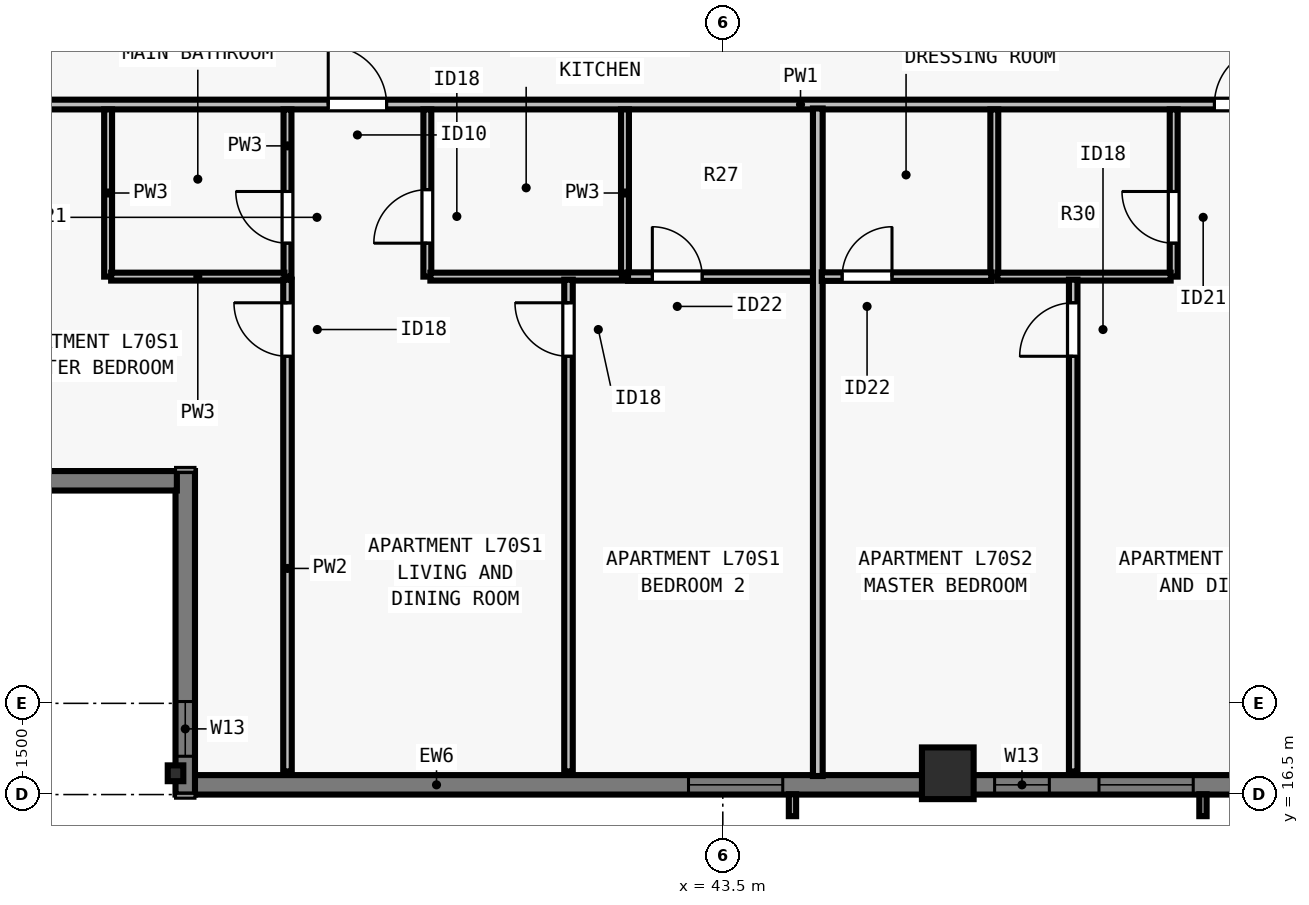
"""IFC4 building model, lengths in metres.
Left out: names, types, materials, properties, quantities, classifications, styles, units other than length and angle.
Written with IfcOpenShell. Run it as: python <this file> out.ifc"""

import sys

from ifc_helpers import new_model, si_unit, direction, frame, frame_2d, origin, origin_2d, place, context, subcontext, project, spatial, rectangle, i_section, extrude, element, fill, save


model = new_model("IFC4")
c1 = context("Model", 3, precision=1e-05, world=origin(), true_north=direction((0.0, 1.0)))
c2 = subcontext(c1, "Body", "Model", "MODEL_VIEW")
j1 = project(units=[si_unit("LENGTHUNIT", "METRE"), si_unit("PLANEANGLEUNIT", "RADIAN")], contexts=[c1])
p1 = place(None, origin())
s1 = spatial("IfcSite", under=j1, at=p1, CompositionType="ELEMENT")
p2 = place(p1, origin())
s2 = spatial("IfcBuilding", under=s1, at=p2, CompositionType="ELEMENT")
p3 = place(p2, frame((0.0, 0.0, 255.0)))
s3 = spatial("IfcBuildingStorey", under=s2, at=p3, CompositionType="ELEMENT", Elevation=255.0)
p4 = place(p3, frame((34.5, 16.85, 0.0), z_axis=(0.0, 0.0, 1.0), x_axis=(1.0, 0.0, 0.0)))
e1 = element("IfcColumn", 1, at=p4, inside=s3, PredefinedType="COLUMN", context=c2, shape_type="SweptSolid", body=[
    extrude(i_section(OverallWidth=0.256, OverallDepth=0.26, WebThickness=0.01, FlangeThickness=0.017, FilletRadius=0.013, at=origin_2d()), origin(), (0.0, 0.0, 1.0), 3.5),
])
p5 = place(p3, frame((47.2, 16.85, 0.0), z_axis=(0.0, 0.0, 1.0), x_axis=(1.0, 0.0, 0.0)))
e2 = element("IfcColumn", 2, at=p5, inside=s3, PredefinedType="COLUMN", context=c2, shape_type="SweptSolid", body=[
    extrude(rectangle(XDim=0.85, YDim=0.85, at=origin_2d()), origin(), (0.0, 0.0, 1.0), 3.5),
])
p6 = place(p3, frame((69.5, 16.66, 0.0), z_axis=(0.0, 0.0, 1.0), x_axis=(-1.0, 0.0, 0.0)))
e3 = element("IfcWall", 3, at=p6, inside=s3, PredefinedType="SOLIDWALL", context=c2, shape_type="SweptSolid", body=[
    extrude(rectangle(XDim=34.702, YDim=0.32, at=frame_2d((17.351, 0.0))), origin(), (0.0, 0.0, 1.0), 3.29),
])
p7 = place(p6, frame((4.312, 0.0, 0.8)))
e4 = element("IfcOpeningElement", 4, at=p7, cuts=e3, PredefinedType="OPENING", context=c2, shape_type="SweptSolid", body=[
    extrude(rectangle(XDim=1.55, YDim=1.678, at=frame_2d((0.775, 0.839))), frame((0.0, 0.17, 0.0), z_axis=(0.0, -1.0, 0.0), x_axis=(1.0, 0.0, 0.0)), (0.0, 0.0, 1.0), 0.34),
])
p8 = place(p6, frame((7.988, 0.0, 0.8)))
e5 = element("IfcOpeningElement", 5, at=p8, cuts=e3, PredefinedType="OPENING", context=c2, shape_type="SweptSolid", body=[
    extrude(rectangle(XDim=1.85, YDim=1.678, at=frame_2d((0.925, 0.839))), frame((0.0, 0.17, 0.0), z_axis=(0.0, -1.0, 0.0), x_axis=(1.0, 0.0, 0.0)), (0.0, 0.0, 1.0), 0.34),
])
p9 = place(p6, frame((15.188, 0.0, 0.8)))
e6 = element("IfcOpeningElement", 6, at=p9, cuts=e3, PredefinedType="OPENING", context=c2, shape_type="SweptSolid", body=[
    extrude(rectangle(XDim=1.85, YDim=1.678, at=frame_2d((0.925, 0.839))), frame((0.0, 0.17, 0.0), z_axis=(0.0, -1.0, 0.0), x_axis=(1.0, 0.0, 0.0)), (0.0, 0.0, 1.0), 0.34),
])
p10 = place(p6, frame((18.264, 0.0, 0.8)))
e7 = element("IfcOpeningElement", 7, at=p10, cuts=e3, PredefinedType="OPENING", context=c2, shape_type="SweptSolid", body=[
    extrude(rectangle(XDim=1.55, YDim=1.678, at=frame_2d((0.775, 0.839))), frame((0.0, 0.17, 0.0), z_axis=(0.0, -1.0, 0.0), x_axis=(1.0, 0.0, 0.0)), (0.0, 0.0, 1.0), 0.34),
])
p11 = place(p6, frame((25.014, 0.0, 0.8)))
e8 = element("IfcOpeningElement", 8, at=p11, cuts=e3, PredefinedType="OPENING", context=c2, shape_type="SweptSolid", body=[
    extrude(rectangle(XDim=1.55, YDim=1.678, at=frame_2d((0.775, 0.839))), frame((0.0, 0.17, 0.0), z_axis=(0.0, -1.0, 0.0), x_axis=(1.0, 0.0, 0.0)), (0.0, 0.0, 1.0), 0.34),
])
p12 = place(p6, frame((20.63, 0.0, 0.8)))
e9 = element("IfcOpeningElement", 9, at=p12, cuts=e3, PredefinedType="OPENING", context=c2, shape_type="SweptSolid", body=[
    extrude(rectangle(XDim=0.9, YDim=1.678, at=frame_2d((0.45, 0.839))), frame((0.0, 0.17, 0.0), z_axis=(0.0, -1.0, 0.0), x_axis=(1.0, 0.0, 0.0)), (0.0, 0.0, 1.0), 0.34),
])
p13 = place(p6, frame((10.87, 0.0, 0.8)))
e10 = element("IfcOpeningElement", 10, at=p13, cuts=e3, PredefinedType="OPENING", context=c2, shape_type="SweptSolid", body=[
    extrude(rectangle(XDim=0.9, YDim=1.678, at=frame_2d((0.45, 0.839))), frame((0.0, 0.17, 0.0), z_axis=(0.0, -1.0, 0.0), x_axis=(1.0, 0.0, 0.0)), (0.0, 0.0, 1.0), 0.34),
])
p14 = place(p3, frame((34.66, 16.5, 0.0), z_axis=(0.0, 0.0, 1.0), x_axis=(0.0, 1.0, 0.0)))
e11 = element("IfcWall", 11, at=p14, inside=s3, PredefinedType="SOLIDWALL", context=c2, shape_type="SweptSolid", body=[
    extrude(rectangle(XDim=5.32, YDim=0.32, at=frame_2d((2.66, 0.0))), origin(), (0.0, 0.0, 1.0), 3.29),
])
p15 = place(p14, frame((0.63, 0.0, 0.8)))
e12 = element("IfcOpeningElement", 12, at=p15, cuts=e11, PredefinedType="OPENING", context=c2, shape_type="SweptSolid", body=[
    extrude(rectangle(XDim=0.9, YDim=1.678, at=frame_2d((0.45, 0.839))), frame((0.0, 0.17, 0.0), z_axis=(0.0, -1.0, 0.0), x_axis=(1.0, 0.0, 0.0)), (0.0, 0.0, 1.0), 0.34),
])
p16 = place(p3, frame((34.522, 21.66, 0.0), z_axis=(0.0, 0.0, 1.0), x_axis=(-1.0, 0.0, 0.0)))
e13 = element("IfcWall", 13, at=p16, inside=s3, PredefinedType="SOLIDWALL", context=c2, shape_type="SweptSolid", body=[
    extrude(rectangle(XDim=4.724, YDim=0.32, at=frame_2d((2.362, 0.0))), origin(), (0.0, 0.0, 1.0), 3.29),
])
p17 = place(p3, frame((32.06, 27.847, 0.0), z_axis=(0.0, 0.0, 1.0), x_axis=(1.0, 0.0, 0.0)))
e14 = element("IfcWall", 14, at=p17, inside=s3, PredefinedType="PARTITIONING", context=c2, shape_type="SweptSolid", body=[
    extrude(rectangle(XDim=42.135, YDim=0.16, at=frame_2d((21.067, 0.0))), origin(), (0.0, 0.0, 1.0), 2.958),
])
p18 = place(p17, frame((4.951, 0.0, 0.0)))
e15 = element("IfcOpeningElement", 15, at=p18, cuts=e14, PredefinedType="OPENING", context=c2, shape_type="SweptSolid", body=[
    extrude(rectangle(XDim=0.96, YDim=2.18, at=frame_2d((0.48, 1.09))), frame((0.0, 0.09, 0.0), z_axis=(0.0, -1.0, 0.0), x_axis=(1.0, 0.0, 0.0)), (0.0, 0.0, 1.0), 0.18),
])
p19 = place(p17, frame((19.525, 0.0, 0.0)))
e16 = element("IfcOpeningElement", 16, at=p19, cuts=e14, PredefinedType="OPENING", context=c2, shape_type="SweptSolid", body=[
    extrude(rectangle(XDim=0.96, YDim=2.18, at=frame_2d((0.48, 1.09))), frame((0.0, 0.09, 0.0), z_axis=(0.0, -1.0, 0.0), x_axis=(1.0, 0.0, 0.0)), (0.0, 0.0, 1.0), 0.18),
])
p20 = place(p17, frame((34.034, 0.0, 0.0)))
e17 = element("IfcOpeningElement", 17, at=p20, cuts=e14, PredefinedType="OPENING", context=c2, shape_type="SweptSolid", body=[
    extrude(rectangle(XDim=0.96, YDim=2.18, at=frame_2d((0.48, 1.09))), frame((0.0, 0.09, 0.0), z_axis=(0.0, -1.0, 0.0), x_axis=(1.0, 0.0, 0.0)), (0.0, 0.0, 1.0), 0.18),
])
p21 = place(p3, frame((33.391, 25.018, 0.0), z_axis=(0.0, 0.0, 1.0), x_axis=(0.0, 1.0, 0.0)))
e18 = element("IfcWall", 18, at=p21, inside=s3, PredefinedType="PLUMBINGWALL", context=c2, shape_type="SweptSolid", body=[
    extrude(rectangle(XDim=2.75, YDim=0.13, at=frame_2d((1.375, 0.0))), origin(), (0.0, 0.0, 1.0), 3.29),
])
p22 = place(p3, frame((36.341, 25.018, 0.0), z_axis=(0.0, 0.0, 1.0), x_axis=(0.0, 1.0, 0.0)))
e19 = element("IfcWall", 19, at=p22, inside=s3, PredefinedType="PLUMBINGWALL", context=c2, shape_type="SweptSolid", body=[
    extrude(rectangle(XDim=2.75, YDim=0.13, at=frame_2d((1.375, 0.0))), origin(), (0.0, 0.0, 1.0), 3.29),
])
p23 = place(p22, frame((0.55, 0.0, 0.0)))
e20 = element("IfcOpeningElement", 20, at=p23, cuts=e19, PredefinedType="OPENING", context=c2, shape_type="SweptSolid", body=[
    extrude(rectangle(XDim=0.85, YDim=2.08, at=frame_2d((0.425, 1.04))), frame((0.0, 0.075, 0.0), z_axis=(0.0, -1.0, 0.0), x_axis=(1.0, 0.0, 0.0)), (0.0, 0.0, 1.0), 0.15),
])
p24 = place(p3, frame((33.441, 25.018, 0.0), z_axis=(0.0, 0.0, 1.0), x_axis=(1.0, 0.0, 0.0)))
e21 = element("IfcWall", 21, at=p24, inside=s3, PredefinedType="PLUMBINGWALL", context=c2, shape_type="SweptSolid", body=[
    extrude(rectangle(XDim=2.85, YDim=0.13, at=frame_2d((1.425, 0.0))), origin(), (0.0, 0.0, 1.0), 2.958),
])
p25 = place(p3, frame((41.891, 25.018, 0.0), z_axis=(0.0, 0.0, 1.0), x_axis=(0.0, 1.0, 0.0)))
e22 = element("IfcWall", 22, at=p25, inside=s3, PredefinedType="PLUMBINGWALL", context=c2, shape_type="SweptSolid", body=[
    extrude(rectangle(XDim=2.75, YDim=0.13, at=frame_2d((1.375, 0.0))), origin(), (0.0, 0.0, 1.0), 3.29),
])
p26 = place(p3, frame((38.641, 25.018, 0.0), z_axis=(0.0, 0.0, 1.0), x_axis=(0.0, 1.0, 0.0)))
e23 = element("IfcWall", 23, at=p26, inside=s3, PredefinedType="PLUMBINGWALL", context=c2, shape_type="SweptSolid", body=[
    extrude(rectangle(XDim=2.75, YDim=0.13, at=frame_2d((1.375, 0.0))), origin(), (0.0, 0.0, 1.0), 3.29),
])
p27 = place(p26, frame((0.55, 0.0, 0.0)))
e24 = element("IfcOpeningElement", 24, at=p27, cuts=e23, PredefinedType="OPENING", context=c2, shape_type="SweptSolid", body=[
    extrude(rectangle(XDim=0.88, YDim=2.1, at=frame_2d((0.44, 1.05))), frame((0.0, 0.075, 0.0), z_axis=(0.0, -1.0, 0.0), x_axis=(1.0, 0.0, 0.0)), (0.0, 0.0, 1.0), 0.15),
])
p28 = place(p3, frame((38.691, 25.018, 0.0), z_axis=(0.0, 0.0, 1.0), x_axis=(1.0, 0.0, 0.0)))
e25 = element("IfcWall", 25, at=p28, inside=s3, PredefinedType="PLUMBINGWALL", context=c2, shape_type="SweptSolid", body=[
    extrude(rectangle(XDim=3.15, YDim=0.13, at=frame_2d((1.575, 0.0))), origin(), (0.0, 0.0, 1.0), 3.29),
])
p29 = place(p3, frame((36.341, 16.88, 0.0), z_axis=(0.0, 0.0, 1.0), x_axis=(0.0, 1.0, 0.0)))
e26 = element("IfcWall", 26, at=p29, inside=s3, PredefinedType="PARTITIONING", context=c2, shape_type="SweptSolid", body=[
    extrude(rectangle(XDim=8.088, YDim=0.14, at=frame_2d((4.044, 0.0))), origin(), (0.0, 0.0, 1.0), 2.573),
])
p30 = place(p29, frame((6.827, 0.0, 0.0)))
e27 = element("IfcOpeningElement", 27, at=p30, cuts=e26, PredefinedType="OPENING", context=c2, shape_type="SweptSolid", body=[
    extrude(rectangle(XDim=0.88, YDim=2.1, at=frame_2d((0.44, 1.05))), frame((0.0, 0.08, 0.0), z_axis=(0.0, -1.0, 0.0), x_axis=(1.0, 0.0, 0.0)), (0.0, 0.0, 1.0), 0.16),
])
p31 = place(p3, frame((40.962, 16.88, 0.0), z_axis=(0.0, 0.0, 1.0), x_axis=(0.0, 1.0, 0.0)))
e28 = element("IfcWall", 28, at=p31, inside=s3, PredefinedType="PARTITIONING", context=c2, shape_type="SweptSolid", body=[
    extrude(rectangle(XDim=8.088, YDim=0.14, at=frame_2d((4.044, 0.0))), origin(), (0.0, 0.0, 1.0), 3.29),
])
p32 = place(p31, frame((6.827, 0.0, 0.0)))
e29 = element("IfcOpeningElement", 29, at=p32, cuts=e28, PredefinedType="OPENING", context=c2, shape_type="SweptSolid", body=[
    extrude(rectangle(XDim=0.88, YDim=2.1, at=frame_2d((0.44, 1.05))), frame((0.0, 0.08, 0.0), z_axis=(0.0, -1.0, 0.0), x_axis=(1.0, 0.0, 0.0)), (0.0, 0.0, 1.0), 0.16),
])
p33 = place(p3, frame((41.941, 25.018, 0.0), z_axis=(0.0, 0.0, 1.0), x_axis=(1.0, 0.0, 0.0)))
e30 = element("IfcWall", 30, at=p33, inside=s3, PredefinedType="PARTITIONING", context=c2, shape_type="SweptSolid", body=[
    extrude(rectangle(XDim=3.171, YDim=0.14, at=frame_2d((1.586, 0.0))), origin(), (0.0, 0.0, 1.0), 3.29),
])
p34 = place(p33, frame((0.4, 0.0, 0.0)))
e31 = element("IfcOpeningElement", 31, at=p34, cuts=e30, PredefinedType="OPENING", context=c2, shape_type="SweptSolid", body=[
    extrude(rectangle(XDim=0.82, YDim=2.1, at=frame_2d((0.41, 1.05))), frame((0.0, 0.08, 0.0), z_axis=(0.0, -1.0, 0.0), x_axis=(1.0, 0.0, 0.0)), (0.0, 0.0, 1.0), 0.16),
])
p35 = place(p3, frame((45.062, 16.805, 0.0), z_axis=(0.0, 0.0, 1.0), x_axis=(0.0, 1.0, 0.0)))
e32 = element("IfcWall", 32, at=p35, inside=s3, PredefinedType="PARTITIONING", context=c2, shape_type="SweptSolid", body=[
    extrude(rectangle(XDim=10.978, YDim=0.16, at=frame_2d((5.489, 0.0))), origin(), (0.0, 0.0, 1.0), 3.29),
])
p36 = place(p3, frame((47.965, 25.018, 0.0), z_axis=(0.0, 0.0, 1.0), x_axis=(0.0, 1.0, 0.0)))
e33 = element("IfcWall", 33, at=p36, inside=s3, PredefinedType="PLUMBINGWALL", context=c2, shape_type="SweptSolid", body=[
    extrude(rectangle(XDim=2.75, YDim=0.13, at=frame_2d((1.375, 0.0))), origin(), (0.0, 0.0, 1.0), 3.29),
])
p37 = place(p3, frame((50.915, 25.018, 0.0), z_axis=(0.0, 0.0, 1.0), x_axis=(0.0, 1.0, 0.0)))
e34 = element("IfcWall", 34, at=p37, inside=s3, PredefinedType="PLUMBINGWALL", context=c2, shape_type="SweptSolid", body=[
    extrude(rectangle(XDim=2.75, YDim=0.13, at=frame_2d((1.375, 0.0))), origin(), (0.0, 0.0, 1.0), 3.29),
])
p38 = place(p37, frame((0.55, 0.0, 0.0)))
e35 = element("IfcOpeningElement", 35, at=p38, cuts=e34, PredefinedType="OPENING", context=c2, shape_type="SweptSolid", body=[
    extrude(rectangle(XDim=0.85, YDim=2.08, at=frame_2d((0.425, 1.04))), frame((0.0, 0.075, 0.0), z_axis=(0.0, -1.0, 0.0), x_axis=(1.0, 0.0, 0.0)), (0.0, 0.0, 1.0), 0.15),
])
p39 = place(p3, frame((48.015, 25.018, 0.0), z_axis=(0.0, 0.0, 1.0), x_axis=(1.0, 0.0, 0.0)))
e36 = element("IfcWall", 36, at=p39, inside=s3, PredefinedType="PLUMBINGWALL", context=c2, shape_type="SweptSolid", body=[
    extrude(rectangle(XDim=2.85, YDim=0.13, at=frame_2d((1.425, 0.0))), origin(), (0.0, 0.0, 1.0), 3.29),
])
p40 = place(p3, frame((49.262, 16.88, 0.0), z_axis=(0.0, 0.0, 1.0), x_axis=(0.0, 1.0, 0.0)))
e37 = element("IfcWall", 37, at=p40, inside=s3, PredefinedType="PARTITIONING", context=c2, shape_type="SweptSolid", body=[
    extrude(rectangle(XDim=8.088, YDim=0.14, at=frame_2d((4.044, 0.0))), origin(), (0.0, 0.0, 1.0), 2.958),
])
p41 = place(p40, frame((6.827, 0.0, 0.0)))
e38 = element("IfcOpeningElement", 38, at=p41, cuts=e37, PredefinedType="OPENING", context=c2, shape_type="SweptSolid", body=[
    extrude(rectangle(XDim=0.88, YDim=2.1, at=frame_2d((0.44, 1.05))), frame((0.0, 0.08, 0.0), z_axis=(0.0, -1.0, 0.0), x_axis=(1.0, 0.0, 0.0)), (0.0, 0.0, 1.0), 0.16),
])
p42 = place(p3, frame((45.127, 25.018, 0.0), z_axis=(0.0, 0.0, 1.0), x_axis=(1.0, 0.0, 0.0)))
e39 = element("IfcWall", 39, at=p42, inside=s3, PredefinedType="PARTITIONING", context=c2, shape_type="SweptSolid", body=[
    extrude(rectangle(XDim=2.788, YDim=0.14, at=frame_2d((1.394, 0.0))), origin(), (0.0, 0.0, 1.0), 3.29),
])
p43 = place(p42, frame((0.335, 0.0, 0.0)))
e40 = element("IfcOpeningElement", 40, at=p43, cuts=e39, PredefinedType="OPENING", context=c2, shape_type="SweptSolid", body=[
    extrude(rectangle(XDim=0.82, YDim=2.1, at=frame_2d((0.41, 1.05))), frame((0.0, 0.08, 0.0), z_axis=(0.0, -1.0, 0.0), x_axis=(1.0, 0.0, 0.0)), (0.0, 0.0, 1.0), 0.16),
])
p44 = place(p10, origin())
e41 = element("IfcWindow", 41, at=p44, inside=s3, PartitioningType="SINGLE_PANEL", PredefinedType="WINDOW", context=c2, shape_type="SweptSolid", body=[
    extrude(rectangle(XDim=1.55, YDim=1.678, at=frame_2d((0.775, 0.839))), frame((0.0, -0.05, 0.0), z_axis=(0.0, -1.0, 0.0), x_axis=(1.0, 0.0, 0.0)), (0.0, 0.0, 1.0), 0.06),
])
fill(e7, e41)
p45 = place(p11, origin())
e42 = element("IfcWindow", 42, at=p45, inside=s3, PartitioningType="SINGLE_PANEL", PredefinedType="WINDOW", context=c2, shape_type="SweptSolid", body=[
    extrude(rectangle(XDim=1.55, YDim=1.678, at=frame_2d((0.775, 0.839))), frame((0.0, -0.05, 0.0), z_axis=(0.0, -1.0, 0.0), x_axis=(1.0, 0.0, 0.0)), (0.0, 0.0, 1.0), 0.06),
])
fill(e8, e42)
p46 = place(p15, origin())
e43 = element("IfcWindow", 43, at=p46, inside=s3, PartitioningType="SINGLE_PANEL", PredefinedType="WINDOW", context=c2, shape_type="SweptSolid", body=[
    extrude(rectangle(XDim=0.9, YDim=1.678, at=frame_2d((0.45, 0.839))), frame((0.0, -0.04, 0.0), z_axis=(0.0, -1.0, 0.0), x_axis=(1.0, 0.0, 0.0)), (0.0, 0.0, 1.0), 0.06),
])
fill(e12, e43)
p47 = place(p12, origin())
e44 = element("IfcWindow", 44, at=p47, inside=s3, PartitioningType="SINGLE_PANEL", PredefinedType="WINDOW", context=c2, shape_type="SweptSolid", body=[
    extrude(rectangle(XDim=0.9, YDim=1.678, at=frame_2d((0.45, 0.839))), frame((0.0, -0.04, 0.0), z_axis=(0.0, -1.0, 0.0), x_axis=(1.0, 0.0, 0.0)), (0.0, 0.0, 1.0), 0.06),
])
fill(e9, e44)
p48 = place(p23, origin())
e45 = element("IfcDoor", 45, at=p48, inside=s3, OperationType="SINGLE_SWING_RIGHT", PredefinedType="DOOR", context=c2, shape_type="SweptSolid", body=[
    extrude(rectangle(XDim=0.85, YDim=2.08, at=frame_2d((0.425, 1.04))), frame((0.0, 0.025, 0.0), z_axis=(0.0, -1.0, 0.0), x_axis=(1.0, 0.0, 0.0)), (0.0, 0.0, 1.0), 0.05),
])
fill(e20, e45)
p49 = place(p27, origin())
e46 = element("IfcDoor", 46, at=p49, inside=s3, OperationType="SINGLE_SWING_LEFT", PredefinedType="DOOR", context=c2, shape_type="SweptSolid", body=[
    extrude(rectangle(XDim=0.88, YDim=2.1, at=frame_2d((0.44, 1.05))), frame((0.0, 0.025, 0.0), z_axis=(0.0, -1.0, 0.0), x_axis=(1.0, 0.0, 0.0)), (0.0, 0.0, 1.0), 0.05),
])
fill(e24, e46)
p50 = place(p30, origin())
e47 = element("IfcDoor", 47, at=p50, inside=s3, OperationType="SINGLE_SWING_RIGHT", PredefinedType="DOOR", context=c2, shape_type="SweptSolid", body=[
    extrude(rectangle(XDim=0.88, YDim=2.1, at=frame_2d((0.44, 1.05))), frame((0.0, 0.025, 0.0), z_axis=(0.0, -1.0, 0.0), x_axis=(1.0, 0.0, 0.0)), (0.0, 0.0, 1.0), 0.05),
])
fill(e27, e47)
p51 = place(p34, origin())
e48 = element("IfcDoor", 48, at=p51, inside=s3, OperationType="SINGLE_SWING_LEFT", PredefinedType="DOOR", context=c2, shape_type="SweptSolid", body=[
    extrude(rectangle(XDim=0.82, YDim=2.1, at=frame_2d((0.41, 1.05))), frame((0.0, 0.025, 0.0), z_axis=(0.0, -1.0, 0.0), x_axis=(1.0, 0.0, 0.0)), (0.0, 0.0, 1.0), 0.05),
])
fill(e31, e48)
p52 = place(p32, origin())
e49 = element("IfcDoor", 49, at=p52, inside=s3, OperationType="SINGLE_SWING_RIGHT", PredefinedType="DOOR", context=c2, shape_type="SweptSolid", body=[
    extrude(rectangle(XDim=0.88, YDim=2.1, at=frame_2d((0.44, 1.05))), frame((0.0, 0.025, 0.0), z_axis=(0.0, -1.0, 0.0), x_axis=(1.0, 0.0, 0.0)), (0.0, 0.0, 1.0), 0.05),
])
fill(e29, e49)
p53 = place(p18, origin())
e50 = element("IfcDoor", 50, at=p53, inside=s3, OperationType="SINGLE_SWING_LEFT", PredefinedType="DOOR", context=c2, shape_type="SweptSolid", body=[
    extrude(rectangle(XDim=0.96, YDim=2.18, at=frame_2d((0.48, 1.09))), frame((0.0, 0.025, 0.0), z_axis=(0.0, -1.0, 0.0), x_axis=(1.0, 0.0, 0.0)), (0.0, 0.0, 1.0), 0.05),
])
fill(e15, e50)
p54 = place(p38, origin())
e51 = element("IfcDoor", 51, at=p54, inside=s3, OperationType="SINGLE_SWING_RIGHT", PredefinedType="DOOR", context=c2, shape_type="SweptSolid", body=[
    extrude(rectangle(XDim=0.85, YDim=2.08, at=frame_2d((0.425, 1.04))), frame((0.0, 0.025, 0.0), z_axis=(0.0, -1.0, 0.0), x_axis=(1.0, 0.0, 0.0)), (0.0, 0.0, 1.0), 0.05),
])
fill(e35, e51)
p55 = place(p43, origin())
e52 = element("IfcDoor", 52, at=p55, inside=s3, OperationType="SINGLE_SWING_RIGHT", PredefinedType="DOOR", context=c2, shape_type="SweptSolid", body=[
    extrude(rectangle(XDim=0.82, YDim=2.1, at=frame_2d((0.41, 1.05))), frame((0.0, 0.025, 0.0), z_axis=(0.0, -1.0, 0.0), x_axis=(1.0, 0.0, 0.0)), (0.0, 0.0, 1.0), 0.05),
])
fill(e40, e52)
p56 = place(p41, origin())
e53 = element("IfcDoor", 53, at=p56, inside=s3, OperationType="SINGLE_SWING_LEFT", PredefinedType="DOOR", context=c2, shape_type="SweptSolid", body=[
    extrude(rectangle(XDim=0.88, YDim=2.1, at=frame_2d((0.44, 1.05))), frame((0.0, 0.025, 0.0), z_axis=(0.0, -1.0, 0.0), x_axis=(1.0, 0.0, 0.0)), (0.0, 0.0, 1.0), 0.05),
])
fill(e38, e53)
p57 = place(p19, origin())
e54 = element("IfcDoor", 54, at=p57, inside=s3, OperationType="SINGLE_SWING_RIGHT", PredefinedType="DOOR", context=c2, shape_type="SweptSolid", body=[
    extrude(rectangle(XDim=0.96, YDim=2.18, at=frame_2d((0.48, 1.09))), frame((0.0, 0.025, 0.0), z_axis=(0.0, -1.0, 0.0), x_axis=(1.0, 0.0, 0.0)), (0.0, 0.0, 1.0), 0.05),
])
fill(e16, e54)
save(model, sys.argv[1])
